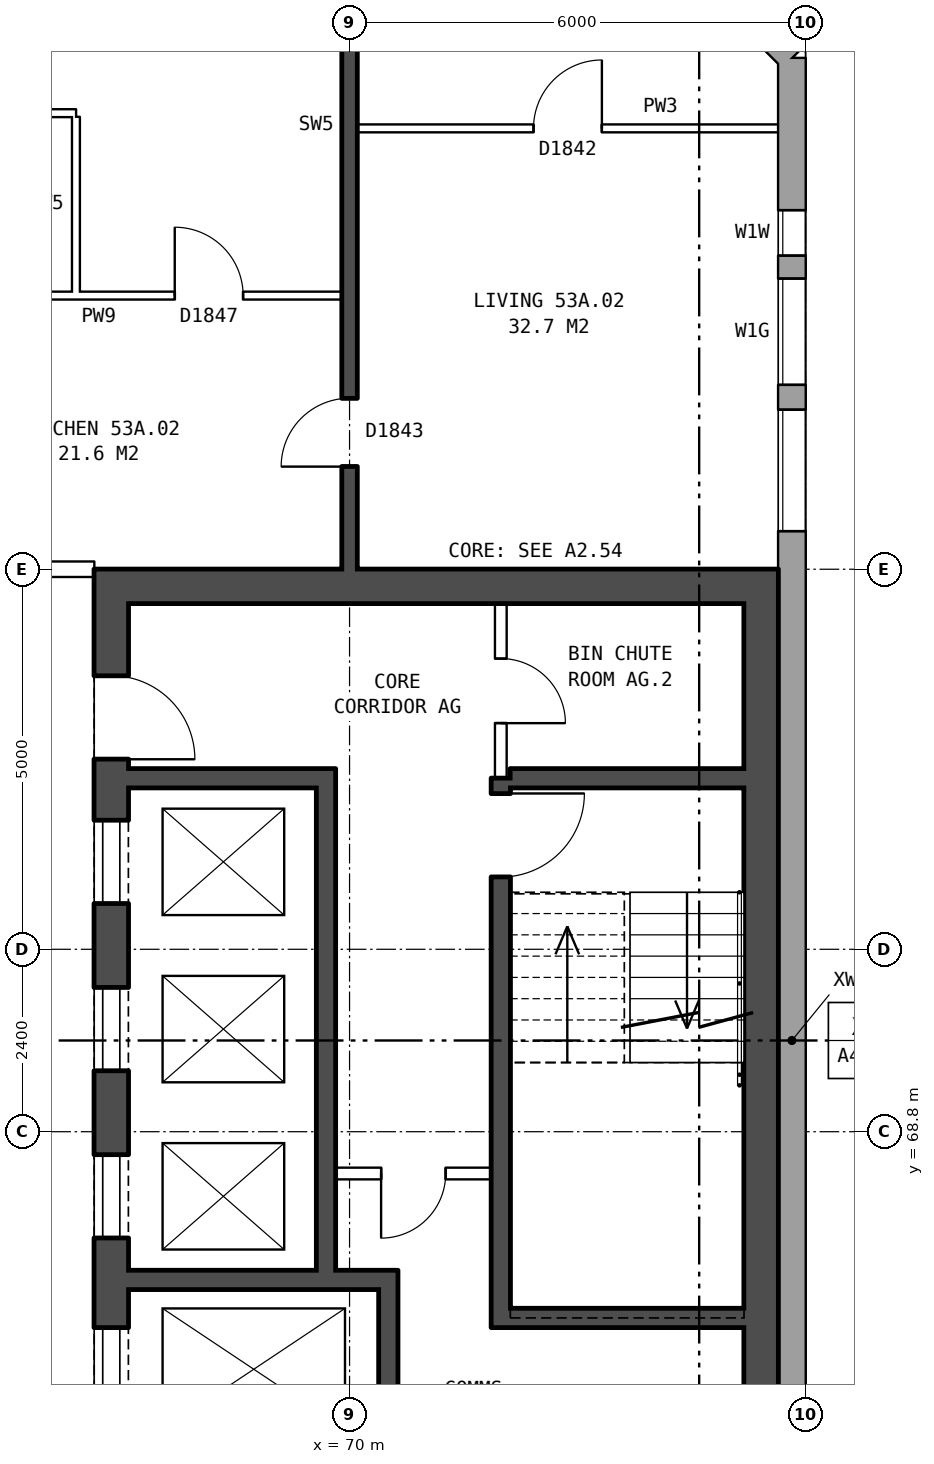
"""IFC4 building model, lengths in metres.
Left out: names, types, materials, properties, quantities, classifications, styles, units other than length and angle.
Written with IfcOpenShell. Run it as: python <this file> out.ifc"""

import sys

from ifc_helpers import new_model, si_unit, direction, frame, frame_2d, origin, place, context, subcontext, project, spatial, rectangle, extrude, element, fill, save


model = new_model("IFC4")
c1 = context("Model", 3, precision=1e-05, world=origin(), true_north=direction((0.0, 1.0)))
c2 = subcontext(c1, "Body", "Model", "MODEL_VIEW")
j1 = project(units=[si_unit("LENGTHUNIT", "METRE"), si_unit("PLANEANGLEUNIT", "RADIAN")], contexts=[c1])
p1 = place(None, origin())
s1 = spatial("IfcSite", under=j1, at=p1, CompositionType="ELEMENT")
p2 = place(p1, origin())
s2 = spatial("IfcBuilding", under=s1, at=p2, CompositionType="ELEMENT")
p3 = place(p2, frame((0.0, 0.0, 188.2)))
s3 = spatial("IfcBuildingStorey", under=s2, at=p3, CompositionType="ELEMENT", Elevation=188.2)
p4 = place(p3, frame((75.82, 57.075, 0.0), z_axis=(0.0, 0.0, 1.0), x_axis=(0.0, 1.0, 0.0)))
e1 = element("IfcWall", 1, at=p4, inside=s3, PredefinedType="STANDARD", context=c2, shape_type="SweptSolid", body=[
    extrude(rectangle(XDim=25.851, YDim=0.36, at=frame_2d((12.925, 0.0))), origin(), (0.0, 0.0, 1.0), 2.85),
])
p5 = place(p4, frame((1.975, 0.0, 1.7)))
e2 = element("IfcOpeningElement", 2, at=p5, cuts=e1, PredefinedType="OPENING", context=c2, shape_type="SweptSolid", body=[
    extrude(rectangle(XDim=1.0, YDim=0.9, at=frame_2d((0.5, 0.45))), frame((0.0, 0.19, 0.0), z_axis=(0.0, -1.0, 0.0), x_axis=(1.0, 0.0, 0.0)), (0.0, 0.0, 1.0), 0.38),
])
p6 = place(p4, frame((4.625, 0.0, 0.8)))
e3 = element("IfcOpeningElement", 3, at=p6, cuts=e1, PredefinedType="OPENING", context=c2, shape_type="SweptSolid", body=[
    extrude(rectangle(XDim=1.6, YDim=1.8, at=frame_2d((0.8, 0.9))), frame((0.0, 0.19, 0.0), z_axis=(0.0, -1.0, 0.0), x_axis=(1.0, 0.0, 0.0)), (0.0, 0.0, 1.0), 0.38),
])
p7 = place(p4, frame((19.625, 0.0, 0.8)))
e4 = element("IfcOpeningElement", 4, at=p7, cuts=e1, PredefinedType="OPENING", context=c2, shape_type="SweptSolid", body=[
    extrude(rectangle(XDim=1.6, YDim=1.8, at=frame_2d((0.8, 0.9))), frame((0.0, 0.19, 0.0), z_axis=(0.0, -1.0, 0.0), x_axis=(1.0, 0.0, 0.0)), (0.0, 0.0, 1.0), 0.38),
])
p8 = place(p4, frame((21.55, 0.0, 1.1)))
e5 = element("IfcOpeningElement", 5, at=p8, cuts=e1, PredefinedType="OPENING", context=c2, shape_type="SweptSolid", body=[
    extrude(rectangle(XDim=1.4, YDim=1.5, at=frame_2d((0.7, 0.75))), frame((0.0, 0.19, 0.0), z_axis=(0.0, -1.0, 0.0), x_axis=(1.0, 0.0, 0.0)), (0.0, 0.0, 1.0), 0.38),
])
p9 = place(p4, frame((3.325, 0.0, 0.8)))
e6 = element("IfcOpeningElement", 6, at=p9, cuts=e1, PredefinedType="OPENING", context=c2, shape_type="SweptSolid", body=[
    extrude(rectangle(XDim=1.0, YDim=1.8, at=frame_2d((0.5, 0.9))), frame((0.0, 0.19, 0.0), z_axis=(0.0, -1.0, 0.0), x_axis=(1.0, 0.0, 0.0)), (0.0, 0.0, 1.0), 0.38),
])
p10 = place(p4, frame((23.25, 0.0, 1.7)))
e7 = element("IfcOpeningElement", 7, at=p10, cuts=e1, PredefinedType="OPENING", context=c2, shape_type="SweptSolid", body=[
    extrude(rectangle(XDim=0.6, YDim=0.9, at=frame_2d((0.3, 0.45))), frame((0.0, 0.19, 0.0), z_axis=(0.0, -1.0, 0.0), x_axis=(1.0, 0.0, 0.0)), (0.0, 0.0, 1.0), 0.38),
])
p11 = place(p3, frame((75.82, 82.925, 0.0), z_axis=(0.0, 0.0, 1.0), x_axis=(-0.707106781187, 0.707106781187, 0.0)))
e8 = element("IfcWall", 8, at=p11, inside=s3, PredefinedType="STANDARD", context=c2, shape_type="SweptSolid", body=[
    extrude(rectangle(XDim=4.094, YDim=0.36, at=frame_2d((2.047, 0.0))), origin(), (0.0, 0.0, 1.0), 2.85),
])
p12 = place(p11, frame((1.247, 0.0, 0.8)))
e9 = element("IfcOpeningElement", 9, at=p12, cuts=e8, PredefinedType="OPENING", context=c2, shape_type="SweptSolid", body=[
    extrude(rectangle(XDim=1.6, YDim=1.8, at=frame_2d((0.8, 0.9))), frame((0.0, 0.19, 0.0), z_axis=(0.0, -1.0, 0.0), x_axis=(1.0, 0.0, 0.0)), (0.0, 0.0, 1.0), 0.38),
])
p13 = place(p3, frame((66.865, 63.8, 0.0), z_axis=(0.0, 0.0, 1.0), x_axis=(0.0, 1.0, 0.0)))
e10 = element("IfcWall", 10, at=p13, inside=s3, PredefinedType="SHEAR", context=c2, shape_type="SweptSolid", body=[
    extrude(rectangle(XDim=12.4, YDim=0.45, at=frame_2d((6.2, 0.0))), origin(), (0.0, 0.0, 1.0), 2.85),
])
p14 = place(p13, frame((1.325, 0.0, 0.0)))
e11 = element("IfcOpeningElement", 11, at=p14, cuts=e10, PredefinedType="OPENING", context=c2, shape_type="SweptSolid", body=[
    extrude(rectangle(XDim=1.1, YDim=2.1, at=frame_2d((0.55, 1.05))), frame((0.0, 0.235, 0.0), z_axis=(0.0, -1.0, 0.0), x_axis=(1.0, 0.0, 0.0)), (0.0, 0.0, 1.0), 0.47),
])
p15 = place(p13, frame((3.6, 0.0, 0.0)))
e12 = element("IfcOpeningElement", 12, at=p15, cuts=e10, PredefinedType="OPENING", context=c2, shape_type="SweptSolid", body=[
    extrude(rectangle(XDim=1.1, YDim=2.1, at=frame_2d((0.55, 1.05))), frame((0.0, 0.235, 0.0), z_axis=(0.0, -1.0, 0.0), x_axis=(1.0, 0.0, 0.0)), (0.0, 0.0, 1.0), 0.47),
])
p16 = place(p13, frame((5.8, 0.0, 0.0)))
e13 = element("IfcOpeningElement", 13, at=p16, cuts=e10, PredefinedType="OPENING", context=c2, shape_type="SweptSolid", body=[
    extrude(rectangle(XDim=1.1, YDim=2.1, at=frame_2d((0.55, 1.05))), frame((0.0, 0.235, 0.0), z_axis=(0.0, -1.0, 0.0), x_axis=(1.0, 0.0, 0.0)), (0.0, 0.0, 1.0), 0.47),
])
p17 = place(p13, frame((8.0, 0.0, 0.0)))
e14 = element("IfcOpeningElement", 14, at=p17, cuts=e10, PredefinedType="OPENING", context=c2, shape_type="SweptSolid", body=[
    extrude(rectangle(XDim=1.1, YDim=2.1, at=frame_2d((0.55, 1.05))), frame((0.0, 0.235, 0.0), z_axis=(0.0, -1.0, 0.0), x_axis=(1.0, 0.0, 0.0)), (0.0, 0.0, 1.0), 0.47),
])
p18 = place(p13, frame((9.9, 0.0, 0.0)))
e15 = element("IfcOpeningElement", 15, at=p18, cuts=e10, PredefinedType="OPENING", context=c2, shape_type="SweptSolid", body=[
    extrude(rectangle(XDim=1.1, YDim=2.1, at=frame_2d((0.55, 1.05))), frame((0.0, 0.235, 0.0), z_axis=(0.0, -1.0, 0.0), x_axis=(1.0, 0.0, 0.0)), (0.0, 0.0, 1.0), 0.47),
])
p19 = place(p3, frame((75.415, 63.8, 0.0), z_axis=(0.0, 0.0, 1.0), x_axis=(0.0, 1.0, 0.0)))
e16 = element("IfcWall", 16, at=p19, inside=s3, PredefinedType="SHEAR", context=c2, shape_type="SweptSolid", body=[
    extrude(rectangle(XDim=12.4, YDim=0.45, at=frame_2d((6.2, 0.0))), origin(), (0.0, 0.0, 1.0), 2.85),
])
p20 = place(p3, frame((67.09, 75.975, 0.0), z_axis=(0.0, 0.0, 1.0), x_axis=(1.0, 0.0, 0.0)))
e17 = element("IfcWall", 17, at=p20, inside=s3, PredefinedType="SHEAR", context=c2, shape_type="SweptSolid", body=[
    extrude(rectangle(XDim=8.1, YDim=0.45, at=frame_2d((4.05, 0.0))), origin(), (0.0, 0.0, 1.0), 2.85),
])
p21 = place(p3, frame((72.115, 66.35, 0.0), z_axis=(0.0, 0.0, 1.0), x_axis=(1.0, 0.0, 0.0)))
e18 = element("IfcWall", 18, at=p21, inside=s3, PredefinedType="SHEAR", context=c2, shape_type="SweptSolid", body=[
    extrude(rectangle(XDim=3.075, YDim=0.25, at=frame_2d((1.538, 0.0))), origin(), (0.0, 0.0, 1.0), 2.85),
])
p22 = place(p3, frame((67.09, 66.85, 0.0), z_axis=(0.0, 0.0, 1.0), x_axis=(1.0, 0.0, 0.0)))
e19 = element("IfcWall", 19, at=p22, inside=s3, PredefinedType="SHEAR", context=c2, shape_type="SweptSolid", body=[
    extrude(rectangle(XDim=3.545, YDim=0.25, at=frame_2d((1.772, 0.0))), origin(), (0.0, 0.0, 1.0), 2.85),
])
p23 = place(p3, frame((69.815, 68.25, 0.0), z_axis=(0.0, 0.0, 1.0), x_axis=(1.0, 0.0, 0.0)))
e20 = element("IfcWall", 20, at=p23, inside=s3, PredefinedType="PARTITIONING", context=c2, shape_type="SweptSolid", body=[
    extrude(rectangle(XDim=2.05, YDim=0.15, at=frame_2d((1.025, 0.0))), origin(), (0.0, 0.0, 1.0), 2.85),
])
p24 = place(p23, frame((0.6, 0.0, 0.0)))
e21 = element("IfcOpeningElement", 21, at=p24, cuts=e20, PredefinedType="OPENING", context=c2, shape_type="SweptSolid", body=[
    extrude(rectangle(XDim=0.85, YDim=2.1, at=frame_2d((0.425, 1.05))), frame((0.0, 0.085, 0.0), z_axis=(0.0, -1.0, 0.0), x_axis=(1.0, 0.0, 0.0)), (0.0, 0.0, 1.0), 0.17),
])
p25 = place(p3, frame((67.09, 73.45, 0.0), z_axis=(0.0, 0.0, 1.0), x_axis=(1.0, 0.0, 0.0)))
e22 = element("IfcWall", 22, at=p25, inside=s3, PredefinedType="SHEAR", context=c2, shape_type="SweptSolid", body=[
    extrude(rectangle(XDim=2.475, YDim=0.25, at=frame_2d((1.237, 0.0))), origin(), (0.0, 0.0, 1.0), 2.85),
])
p26 = place(p3, frame((72.115, 73.45, 0.0), z_axis=(0.0, 0.0, 1.0), x_axis=(1.0, 0.0, 0.0)))
e23 = element("IfcWall", 23, at=p26, inside=s3, PredefinedType="SHEAR", context=c2, shape_type="SweptSolid", body=[
    extrude(rectangle(XDim=3.075, YDim=0.25, at=frame_2d((1.538, 0.0))), origin(), (0.0, 0.0, 1.0), 2.85),
])
p27 = place(p3, frame((69.69, 66.975, 0.0), z_axis=(0.0, 0.0, 1.0), x_axis=(0.0, 1.0, 0.0)))
e24 = element("IfcWall", 24, at=p27, inside=s3, PredefinedType="SHEAR", context=c2, shape_type="SweptSolid", body=[
    extrude(rectangle(XDim=6.6, YDim=0.25, at=frame_2d((3.3, 0.0))), origin(), (0.0, 0.0, 1.0), 2.85),
])
p28 = place(p3, frame((70.51, 64.25, 0.0), z_axis=(0.0, 0.0, 1.0), x_axis=(0.0, 1.0, 0.0)))
e25 = element("IfcWall", 25, at=p28, inside=s3, PredefinedType="SHEAR", context=c2, shape_type="SweptSolid", body=[
    extrude(rectangle(XDim=2.475, YDim=0.25, at=frame_2d((1.238, 0.0))), origin(), (0.0, 0.0, 1.0), 2.85),
])
p29 = place(p3, frame((71.99, 66.225, 0.0), z_axis=(0.0, 0.0, 1.0), x_axis=(0.0, 1.0, 0.0)))
e26 = element("IfcWall", 26, at=p29, inside=s3, PredefinedType="SHEAR", context=c2, shape_type="SweptSolid", body=[
    extrude(rectangle(XDim=7.225, YDim=0.25, at=frame_2d((3.612, 0.0))), origin(), (0.0, 0.0, 1.0), 2.85),
])
p30 = place(p29, frame((5.925, 0.0, 0.0)))
e27 = element("IfcOpeningElement", 27, at=p30, cuts=e26, PredefinedType="OPENING", context=c2, shape_type="SweptSolid", body=[
    extrude(rectangle(XDim=1.1, YDim=2.1, at=frame_2d((0.55, 1.05))), frame((0.0, 0.135, 0.0), z_axis=(0.0, -1.0, 0.0), x_axis=(1.0, 0.0, 0.0)), (0.0, 0.0, 1.0), 0.27),
])
p31 = place(p3, frame((71.99, 73.45, 0.0), z_axis=(0.0, 0.0, 1.0), x_axis=(0.0, 1.0, 0.0)))
e28 = element("IfcWall", 28, at=p31, inside=s3, PredefinedType="PARTITIONING", context=c2, shape_type="SweptSolid", body=[
    extrude(rectangle(XDim=2.3, YDim=0.15, at=frame_2d((1.15, 0.0))), origin(), (0.0, 0.0, 1.0), 2.85),
])
p32 = place(p31, frame((0.725, 0.0, 0.0)))
e29 = element("IfcOpeningElement", 29, at=p32, cuts=e28, PredefinedType="OPENING", context=c2, shape_type="SweptSolid", body=[
    extrude(rectangle(XDim=0.85, YDim=2.1, at=frame_2d((0.425, 1.05))), frame((0.0, 0.085, 0.0), z_axis=(0.0, -1.0, 0.0), x_axis=(1.0, 0.0, 0.0)), (0.0, 0.0, 1.0), 0.17),
])
p33 = place(p3, frame((63.64, 76.2, 0.0), z_axis=(0.0, 0.0, 1.0), x_axis=(1.0, 0.0, 0.0)))
e30 = element("IfcWall", 30, at=p33, inside=s3, PredefinedType="PARTITIONING", context=c2, shape_type="SweptSolid", body=[
    extrude(rectangle(XDim=3.0, YDim=0.2, at=frame_2d((1.5, 0.0))), origin(), (0.0, 0.0, 1.0), 2.85),
])
p34 = place(p33, frame((1.18, 0.0, 0.0)))
e31 = element("IfcOpeningElement", 31, at=p34, cuts=e30, PredefinedType="OPENING", context=c2, shape_type="SweptSolid", body=[
    extrude(rectangle(XDim=1.0, YDim=2.1, at=frame_2d((0.5, 1.05))), frame((0.0, 0.11, 0.0), z_axis=(0.0, -1.0, 0.0), x_axis=(1.0, 0.0, 0.0)), (0.0, 0.0, 1.0), 0.22),
])
p35 = place(p3, frame((64.1, 79.8, 0.0), z_axis=(0.0, 0.0, 1.0), x_axis=(1.0, 0.0, 0.0)))
e32 = element("IfcWall", 32, at=p35, inside=s3, PredefinedType="PARTITIONING", context=c2, shape_type="SweptSolid", body=[
    extrude(rectangle(XDim=5.8, YDim=0.1, at=frame_2d((2.9, 0.0))), origin(), (0.0, 0.0, 1.0), 2.85),
])
p36 = place(p35, frame((3.6, 0.0, 0.0)))
e33 = element("IfcOpeningElement", 33, at=p36, cuts=e32, PredefinedType="OPENING", context=c2, shape_type="SweptSolid", body=[
    extrude(rectangle(XDim=0.9, YDim=2.1, at=frame_2d((0.45, 1.05))), frame((0.0, 0.06, 0.0), z_axis=(0.0, -1.0, 0.0), x_axis=(1.0, 0.0, 0.0)), (0.0, 0.0, 1.0), 0.12),
])
p37 = place(p35, frame((0.7, 0.0, 0.0)))
e34 = element("IfcOpeningElement", 34, at=p37, cuts=e32, PredefinedType="OPENING", context=c2, shape_type="SweptSolid", body=[
    extrude(rectangle(XDim=0.9, YDim=2.1, at=frame_2d((0.45, 1.05))), frame((0.0, 0.06, 0.0), z_axis=(0.0, -1.0, 0.0), x_axis=(1.0, 0.0, 0.0)), (0.0, 0.0, 1.0), 0.12),
])
p38 = place(p3, frame((70.1, 82.0, 0.0), z_axis=(0.0, 0.0, 1.0), x_axis=(1.0, 0.0, 0.0)))
e35 = element("IfcWall", 35, at=p38, inside=s3, PredefinedType="PARTITIONING", context=c2, shape_type="SweptSolid", body=[
    extrude(rectangle(XDim=5.54, YDim=0.1, at=frame_2d((2.77, 0.0))), origin(), (0.0, 0.0, 1.0), 2.85),
])
p39 = place(p38, frame((2.32, 0.0, 0.0)))
e36 = element("IfcOpeningElement", 36, at=p39, cuts=e35, PredefinedType="OPENING", context=c2, shape_type="SweptSolid", body=[
    extrude(rectangle(XDim=0.9, YDim=2.1, at=frame_2d((0.45, 1.05))), frame((0.0, 0.06, 0.0), z_axis=(0.0, -1.0, 0.0), x_axis=(1.0, 0.0, 0.0)), (0.0, 0.0, 1.0), 0.12),
])
for number, where, z_axis, x_axis in (
    (37, (64.1, 82.2, 0.0), (0.0, 0.0, 1.0), (1.0, 0.0, 0.0)),
    (38, (66.4, 79.85, 0.0), (0.0, 0.0, 1.0), (0.0, 1.0, 0.0)),
):
    element("IfcWall", number, at=place(p3, frame(where, z_axis=z_axis, x_axis=x_axis)), inside=s3, PredefinedType="PARTITIONING", context=c2, shape_type="SweptSolid", body=[
        extrude(rectangle(XDim=2.3, YDim=0.1, at=frame_2d((1.15, 0.0))), origin(), (0.0, 0.0, 1.0), 2.85),
    ])
p40 = place(p3, frame((70.0, 76.2, 0.0), z_axis=(0.0, 0.0, 1.0), x_axis=(0.0, 1.0, 0.0)))
e39 = element("IfcWall", 39, at=p40, inside=s3, PredefinedType="SOLIDWALL", context=c2, shape_type="SweptSolid", body=[
    extrude(rectangle(XDim=9.44, YDim=0.2, at=frame_2d((4.72, 0.0))), origin(), (0.0, 0.0, 1.0), 2.85),
])
p41 = place(p40, frame((1.35, 0.0, 0.0)))
e40 = element("IfcOpeningElement", 40, at=p41, cuts=e39, PredefinedType="OPENING", context=c2, shape_type="SweptSolid", body=[
    extrude(rectangle(XDim=0.9, YDim=2.1, at=frame_2d((0.45, 1.05))), frame((0.0, 0.11, 0.0), z_axis=(0.0, -1.0, 0.0), x_axis=(1.0, 0.0, 0.0)), (0.0, 0.0, 1.0), 0.22),
])
p42 = place(p7, origin())
e41 = element("IfcWindow", 41, at=p42, inside=s3, PartitioningType="SINGLE_PANEL", PredefinedType="WINDOW", context=c2, shape_type="SweptSolid", body=[
    extrude(rectangle(XDim=1.6, YDim=1.8, at=frame_2d((0.8, 0.9))), frame((0.0, 0.15, 0.0), z_axis=(0.0, -1.0, 0.0), x_axis=(1.0, 0.0, 0.0)), (0.0, 0.0, 1.0), 0.06),
])
fill(e4, e41)
p43 = place(p8, origin())
e42 = element("IfcWindow", 42, at=p43, inside=s3, PartitioningType="SINGLE_PANEL", PredefinedType="WINDOW", context=c2, shape_type="SweptSolid", body=[
    extrude(rectangle(XDim=1.4, YDim=1.5, at=frame_2d((0.7, 0.75))), frame((0.0, 0.15, 0.0), z_axis=(0.0, -1.0, 0.0), x_axis=(1.0, 0.0, 0.0)), (0.0, 0.0, 1.0), 0.06),
])
fill(e5, e42)
p44 = place(p14, origin())
e43 = element("IfcDoor", 43, at=p44, inside=s3, OperationType="DOUBLE_DOOR_SLIDING", PredefinedType="DOOR", context=c2, shape_type="SweptSolid", body=[
    extrude(rectangle(XDim=1.1, YDim=2.1, at=frame_2d((0.55, 1.05))), frame((0.0, -0.16, 0.0), z_axis=(0.0, -1.0, 0.0), x_axis=(1.0, 0.0, 0.0)), (0.0, 0.0, 1.0), 0.05),
])
fill(e11, e43)
p45 = place(p15, origin())
e44 = element("IfcDoor", 44, at=p45, inside=s3, OperationType="DOUBLE_DOOR_SLIDING", PredefinedType="DOOR", context=c2, shape_type="SweptSolid", body=[
    extrude(rectangle(XDim=1.1, YDim=2.1, at=frame_2d((0.55, 1.05))), frame((0.0, -0.16, 0.0), z_axis=(0.0, -1.0, 0.0), x_axis=(1.0, 0.0, 0.0)), (0.0, 0.0, 1.0), 0.05),
])
fill(e12, e44)
p46 = place(p16, origin())
e45 = element("IfcDoor", 45, at=p46, inside=s3, OperationType="DOUBLE_DOOR_SLIDING", PredefinedType="DOOR", context=c2, shape_type="SweptSolid", body=[
    extrude(rectangle(XDim=1.1, YDim=2.1, at=frame_2d((0.55, 1.05))), frame((0.0, -0.16, 0.0), z_axis=(0.0, -1.0, 0.0), x_axis=(1.0, 0.0, 0.0)), (0.0, 0.0, 1.0), 0.05),
])
fill(e13, e45)
p47 = place(p17, origin())
e46 = element("IfcDoor", 46, at=p47, inside=s3, OperationType="DOUBLE_DOOR_SLIDING", PredefinedType="DOOR", context=c2, shape_type="SweptSolid", body=[
    extrude(rectangle(XDim=1.1, YDim=2.1, at=frame_2d((0.55, 1.05))), frame((0.0, -0.16, 0.0), z_axis=(0.0, -1.0, 0.0), x_axis=(1.0, 0.0, 0.0)), (0.0, 0.0, 1.0), 0.05),
])
fill(e14, e46)
p48 = place(p18, frame((1.1, 0.0, 0.0), z_axis=(0.0, 0.0, 1.0), x_axis=(-1.0, 0.0, 0.0)))
e47 = element("IfcDoor", 47, at=p48, inside=s3, OperationType="SINGLE_SWING_RIGHT", PredefinedType="DOOR", context=c2, shape_type="SweptSolid", body=[
    extrude(rectangle(XDim=1.1, YDim=2.1, at=frame_2d((0.55, 1.05))), frame((0.0, 0.21, 0.0), z_axis=(0.0, -1.0, 0.0), x_axis=(1.0, 0.0, 0.0)), (0.0, 0.0, 1.0), 0.05),
])
fill(e15, e47)
p49 = place(p30, frame((1.1, 0.0, 0.0), z_axis=(0.0, 0.0, 1.0), x_axis=(-1.0, 0.0, 0.0)))
e48 = element("IfcDoor", 48, at=p49, inside=s3, OperationType="SINGLE_SWING_LEFT", PredefinedType="DOOR", context=c2, shape_type="SweptSolid", body=[
    extrude(rectangle(XDim=1.1, YDim=2.1, at=frame_2d((0.55, 1.05))), frame((0.0, 0.025, 0.0), z_axis=(0.0, -1.0, 0.0), x_axis=(1.0, 0.0, 0.0)), (0.0, 0.0, 1.0), 0.05),
])
fill(e27, e48)
p50 = place(p24, frame((0.85, 0.0, 0.0), z_axis=(0.0, 0.0, 1.0), x_axis=(-1.0, 0.0, 0.0)))
e49 = element("IfcDoor", 49, at=p50, inside=s3, OperationType="SINGLE_SWING_RIGHT", PredefinedType="DOOR", context=c2, shape_type="SweptSolid", body=[
    extrude(rectangle(XDim=0.85, YDim=2.1, at=frame_2d((0.425, 1.05))), frame((0.0, 0.025, 0.0), z_axis=(0.0, -1.0, 0.0), x_axis=(1.0, 0.0, 0.0)), (0.0, 0.0, 1.0), 0.05),
])
fill(e21, e49)
p51 = place(p32, frame((0.85, 0.0, 0.0), z_axis=(0.0, 0.0, 1.0), x_axis=(-1.0, 0.0, 0.0)))
e50 = element("IfcDoor", 50, at=p51, inside=s3, OperationType="SINGLE_SWING_RIGHT", PredefinedType="DOOR", context=c2, shape_type="SweptSolid", body=[
    extrude(rectangle(XDim=0.85, YDim=2.1, at=frame_2d((0.425, 1.05))), frame((0.0, 0.025, 0.0), z_axis=(0.0, -1.0, 0.0), x_axis=(1.0, 0.0, 0.0)), (0.0, 0.0, 1.0), 0.05),
])
fill(e29, e50)
p52 = place(p36, origin())
e51 = element("IfcDoor", 51, at=p52, inside=s3, OperationType="SINGLE_SWING_LEFT", PredefinedType="DOOR", context=c2, shape_type="SweptSolid", body=[
    extrude(rectangle(XDim=0.9, YDim=2.1, at=frame_2d((0.45, 1.05))), frame((0.0, 0.025, 0.0), z_axis=(0.0, -1.0, 0.0), x_axis=(1.0, 0.0, 0.0)), (0.0, 0.0, 1.0), 0.05),
])
fill(e33, e51)
p53 = place(p39, origin())
e52 = element("IfcDoor", 52, at=p53, inside=s3, OperationType="SINGLE_SWING_RIGHT", PredefinedType="DOOR", context=c2, shape_type="SweptSolid", body=[
    extrude(rectangle(XDim=0.9, YDim=2.1, at=frame_2d((0.45, 1.05))), frame((0.0, 0.025, 0.0), z_axis=(0.0, -1.0, 0.0), x_axis=(1.0, 0.0, 0.0)), (0.0, 0.0, 1.0), 0.05),
])
fill(e36, e52)
p54 = place(p41, origin())
e53 = element("IfcDoor", 53, at=p54, inside=s3, OperationType="SINGLE_SWING_LEFT", PredefinedType="DOOR", context=c2, shape_type="SweptSolid", body=[
    extrude(rectangle(XDim=0.9, YDim=2.1, at=frame_2d((0.45, 1.05))), frame((0.0, 0.025, 0.0), z_axis=(0.0, -1.0, 0.0), x_axis=(1.0, 0.0, 0.0)), (0.0, 0.0, 1.0), 0.05),
])
fill(e40, e53)
p55 = place(p10, origin())
e54 = element("IfcWindow", 54, at=p55, inside=s3, PartitioningType="SINGLE_PANEL", PredefinedType="WINDOW", context=c2, shape_type="SweptSolid", body=[
    extrude(rectangle(XDim=0.6, YDim=0.9, at=frame_2d((0.3, 0.45))), frame((0.0, 0.15, 0.0), z_axis=(0.0, -1.0, 0.0), x_axis=(1.0, 0.0, 0.0)), (0.0, 0.0, 1.0), 0.06),
])
fill(e7, e54)
save(model, sys.argv[1])
